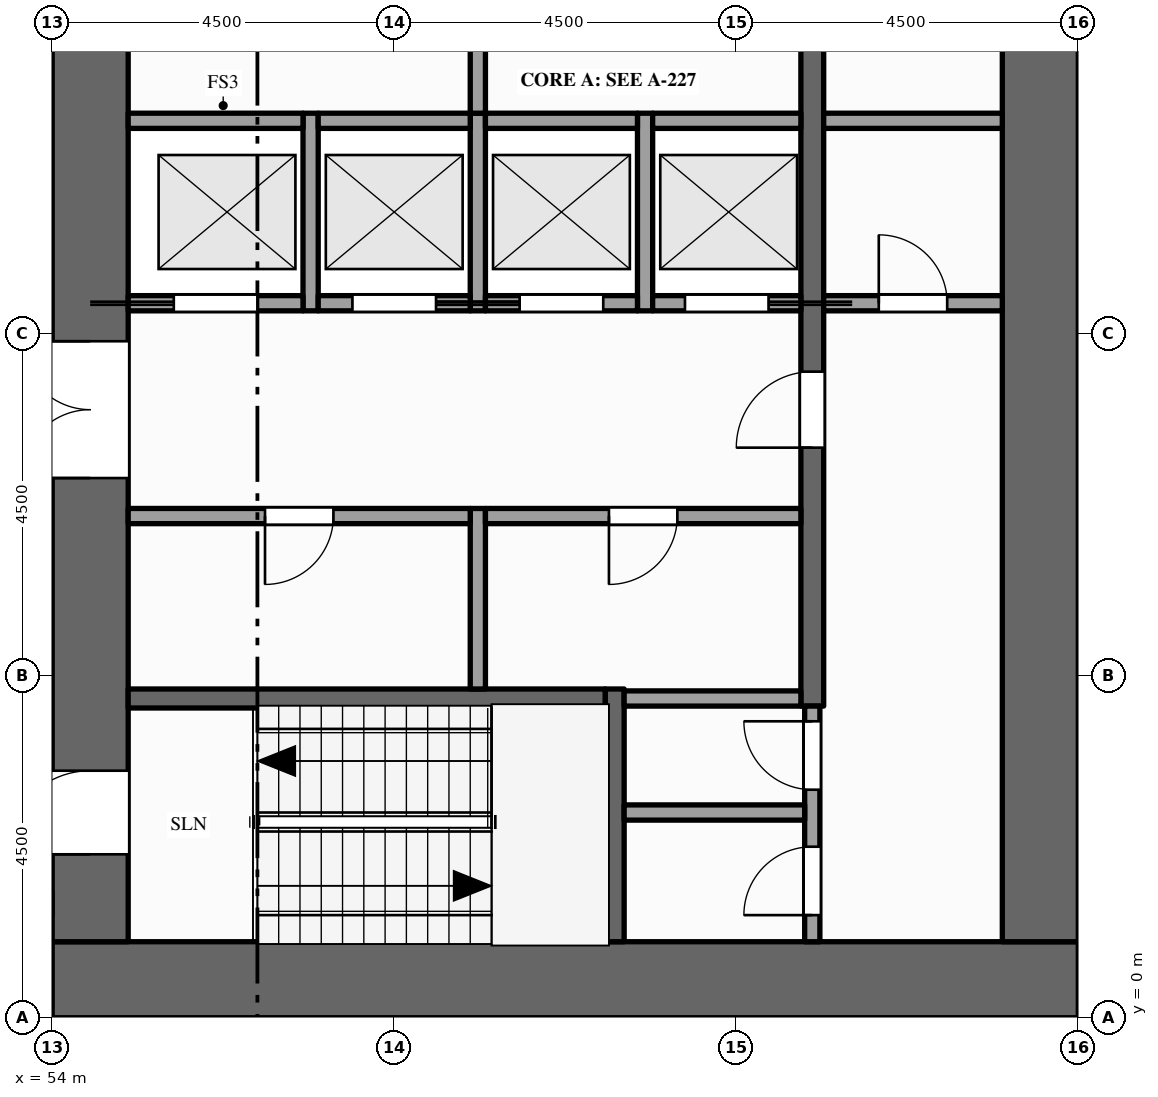
"""IFC4 building model, lengths in metres.
Left out: names, types, materials, properties, quantities, classifications, styles, units other than length and angle.
Written with IfcOpenShell. Run it as: python <this file> out.ifc"""

import sys

from ifc_helpers import new_model, si_unit, direction, frame, frame_2d, origin, place, context, subcontext, project, spatial, rectangle, extrude, element, fill, save


model = new_model("IFC4")
c1 = context("Model", 3, precision=1e-05, world=origin(), true_north=direction((0.0, 1.0)))
c2 = subcontext(c1, "Body", "Model", "MODEL_VIEW")
j1 = project(units=[si_unit("LENGTHUNIT", "METRE"), si_unit("PLANEANGLEUNIT", "RADIAN")], contexts=[c1])
p1 = place(None, origin())
s1 = spatial("IfcSite", under=j1, at=p1, CompositionType="ELEMENT")
p2 = place(p1, origin())
s2 = spatial("IfcBuilding", under=s1, at=p2, CompositionType="ELEMENT")
p3 = place(p2, frame((0.0, 0.0, 147.0)))
s3 = spatial("IfcBuildingStorey", under=s2, at=p3, CompositionType="ELEMENT", Elevation=147.0)
p4 = place(p3, frame((67.5, 0.5, -0.15), z_axis=(0.0, 0.0, 1.0), x_axis=(-1.0, 0.0, 0.0)))
e1 = element("IfcWall", 1, at=p4, inside=s3, PredefinedType="SHEAR", context=c2, shape_type="SweptSolid", body=[
    extrude(rectangle(XDim=13.5, YDim=1.0, at=frame_2d((6.75, 0.0))), origin(), (0.0, 0.0, 1.0), 4.0),
])
p5 = place(p3, frame((54.5, 1.0, -0.15), z_axis=(0.0, 0.0, 1.0), x_axis=(0.0, 1.0, 0.0)))
e2 = element("IfcWall", 2, at=p5, inside=s3, PredefinedType="SHEAR", context=c2, shape_type="SweptSolid", body=[
    extrude(rectangle(XDim=20.5, YDim=1.0, at=frame_2d((10.25, 0.0))), origin(), (0.0, 0.0, 1.0), 4.0),
])
p6 = place(p5, frame((6.1, 0.0, 0.15)))
e3 = element("IfcOpeningElement", 3, at=p6, cuts=e2, PredefinedType="OPENING", context=c2, shape_type="SweptSolid", body=[
    extrude(rectangle(XDim=1.8, YDim=2.1, at=frame_2d((0.9, 1.05))), frame((0.0, 0.51, 0.0), z_axis=(0.0, -1.0, 0.0), x_axis=(1.0, 0.0, 0.0)), (0.0, 0.0, 1.0), 1.02),
])
p7 = place(p5, frame((12.15, 0.0, 0.15)))
e4 = element("IfcOpeningElement", 4, at=p7, cuts=e2, PredefinedType="OPENING", context=c2, shape_type="SweptSolid", body=[
    extrude(rectangle(XDim=1.1, YDim=2.1, at=frame_2d((0.55, 1.05))), frame((0.0, 0.51, 0.0), z_axis=(0.0, -1.0, 0.0), x_axis=(1.0, 0.0, 0.0)), (0.0, 0.0, 1.0), 1.02),
])
p8 = place(p5, frame((1.15, 0.0, 0.15)))
e5 = element("IfcOpeningElement", 5, at=p8, cuts=e2, PredefinedType="OPENING", context=c2, shape_type="SweptSolid", body=[
    extrude(rectangle(XDim=1.1, YDim=2.1, at=frame_2d((0.55, 1.05))), frame((0.0, 0.51, 0.0), z_axis=(0.0, -1.0, 0.0), x_axis=(1.0, 0.0, 0.0)), (0.0, 0.0, 1.0), 1.02),
])
p9 = place(p5, frame((18.35, 0.0, 0.15)))
e6 = element("IfcOpeningElement", 6, at=p9, cuts=e2, PredefinedType="OPENING", context=c2, shape_type="SweptSolid", body=[
    extrude(rectangle(XDim=1.1, YDim=2.1, at=frame_2d((0.55, 1.05))), frame((0.0, 0.51, 0.0), z_axis=(0.0, -1.0, 0.0), x_axis=(1.0, 0.0, 0.0)), (0.0, 0.0, 1.0), 1.02),
])
p10 = place(p3, frame((67.0, 1.0, -0.15), z_axis=(0.0, 0.0, 1.0), x_axis=(0.0, 1.0, 0.0)))
e7 = element("IfcWall", 7, at=p10, inside=s3, PredefinedType="SHEAR", context=c2, shape_type="SweptSolid", body=[
    extrude(rectangle(XDim=20.5, YDim=1.0, at=frame_2d((10.25, 0.0))), origin(), (0.0, 0.0, 1.0), 4.0),
])
p11 = place(p3, frame((57.4, 9.3, 0.0), z_axis=(0.0, 0.0, 1.0), x_axis=(0.0, 1.0, 0.0)))
e8 = element("IfcWall", 8, at=p11, inside=s3, PredefinedType="SOLIDWALL", context=c2, shape_type="SweptSolid", body=[
    extrude(rectangle(XDim=2.6, YDim=0.2, at=frame_2d((1.3, 0.0))), origin(), (0.0, 0.0, 1.0), 3.85),
])
p12 = place(p3, frame((59.6, 4.325, 0.0), z_axis=(0.0, 0.0, 1.0), x_axis=(0.0, 1.0, 0.0)))
e9 = element("IfcWall", 9, at=p12, inside=s3, PredefinedType="PARTITIONING", context=c2, shape_type="SweptSolid", body=[
    extrude(rectangle(XDim=2.375, YDim=0.2, at=frame_2d((1.188, 0.0))), origin(), (0.0, 0.0, 1.0), 3.85),
])
p13 = place(p3, frame((59.6, 9.3, 0.0), z_axis=(0.0, 0.0, 1.0), x_axis=(0.0, 1.0, 0.0)))
e10 = element("IfcWall", 10, at=p13, inside=s3, PredefinedType="SOLIDWALL", context=c2, shape_type="SweptSolid", body=[
    extrude(rectangle(XDim=2.6, YDim=0.2, at=frame_2d((1.3, 0.0))), origin(), (0.0, 0.0, 1.0), 3.85),
])
p14 = place(p3, frame((59.6, 11.9, 0.0), z_axis=(0.0, 0.0, 1.0), x_axis=(0.0, 1.0, 0.0)))
e11 = element("IfcWall", 11, at=p14, inside=s3, PredefinedType="PARTITIONING", context=c2, shape_type="SweptSolid", body=[
    extrude(rectangle(XDim=3.6, YDim=0.2, at=frame_2d((1.8, 0.0))), origin(), (0.0, 0.0, 1.0), 3.85),
])
p15 = place(p14, frame((1.3, 0.0, 0.0)))
e12 = element("IfcOpeningElement", 12, at=p15, cuts=e11, PredefinedType="OPENING", context=c2, shape_type="SweptSolid", body=[
    extrude(rectangle(XDim=1.0, YDim=2.1, at=frame_2d((0.5, 1.05))), frame((0.0, 0.11, 0.0), z_axis=(0.0, -1.0, 0.0), x_axis=(1.0, 0.0, 0.0)), (0.0, 0.0, 1.0), 0.22),
])
p16 = place(p3, frame((61.4, 1.0, 0.0), z_axis=(0.0, 0.0, 1.0), x_axis=(0.0, 1.0, 0.0)))
e13 = element("IfcWall", 13, at=p16, inside=s3, PredefinedType="SHEAR", context=c2, shape_type="SweptSolid", body=[
    extrude(rectangle(XDim=3.325, YDim=0.25, at=frame_2d((1.663, 0.0))), origin(), (0.0, 0.0, 1.0), 3.85),
])
p17 = place(p3, frame((61.8, 9.3, 0.0), z_axis=(0.0, 0.0, 1.0), x_axis=(0.0, 1.0, 0.0)))
e14 = element("IfcWall", 14, at=p17, inside=s3, PredefinedType="SOLIDWALL", context=c2, shape_type="SweptSolid", body=[
    extrude(rectangle(XDim=2.6, YDim=0.2, at=frame_2d((1.3, 0.0))), origin(), (0.0, 0.0, 1.0), 3.85),
])
p18 = place(p3, frame((64.0, 1.0, 0.0), z_axis=(0.0, 0.0, 1.0), x_axis=(0.0, 1.0, 0.0)))
e15 = element("IfcWall", 15, at=p18, inside=s3, PredefinedType="PARTITIONING", context=c2, shape_type="SweptSolid", body=[
    extrude(rectangle(XDim=3.1, YDim=0.2, at=frame_2d((1.55, 0.0))), origin(), (0.0, 0.0, 1.0), 3.85),
])
p19 = place(p18, frame((0.35, 0.0, 0.0)))
e16 = element("IfcOpeningElement", 16, at=p19, cuts=e15, PredefinedType="OPENING", context=c2, shape_type="SweptSolid", body=[
    extrude(rectangle(XDim=0.9, YDim=2.1, at=frame_2d((0.45, 1.05))), frame((0.0, 0.11, 0.0), z_axis=(0.0, -1.0, 0.0), x_axis=(1.0, 0.0, 0.0)), (0.0, 0.0, 1.0), 0.22),
])
p20 = place(p18, frame((2.0, 0.0, 0.0)))
e17 = element("IfcOpeningElement", 17, at=p20, cuts=e15, PredefinedType="OPENING", context=c2, shape_type="SweptSolid", body=[
    extrude(rectangle(XDim=0.9, YDim=2.1, at=frame_2d((0.45, 1.05))), frame((0.0, 0.11, 0.0), z_axis=(0.0, -1.0, 0.0), x_axis=(1.0, 0.0, 0.0)), (0.0, 0.0, 1.0), 0.22),
])
p21 = place(p3, frame((64.0, 4.1, 0.0), z_axis=(0.0, 0.0, 1.0), x_axis=(0.0, 1.0, 0.0)))
e18 = element("IfcWall", 18, at=p21, inside=s3, PredefinedType="SHEAR", context=c2, shape_type="SweptSolid", body=[
    extrude(rectangle(XDim=14.5, YDim=0.3, at=frame_2d((7.25, 0.0))), origin(), (0.0, 0.0, 1.0), 3.85),
])
p22 = place(p21, frame((3.4, 0.0, 0.0)))
e19 = element("IfcOpeningElement", 19, at=p22, cuts=e18, PredefinedType="OPENING", context=c2, shape_type="SweptSolid", body=[
    extrude(rectangle(XDim=1.0, YDim=2.1, at=frame_2d((0.5, 1.05))), frame((0.0, 0.16, 0.0), z_axis=(0.0, -1.0, 0.0), x_axis=(1.0, 0.0, 0.0)), (0.0, 0.0, 1.0), 0.32),
])
p23 = place(p21, frame((9.1, 0.0, 0.0)))
e20 = element("IfcOpeningElement", 20, at=p23, cuts=e18, PredefinedType="OPENING", context=c2, shape_type="SweptSolid", body=[
    extrude(rectangle(XDim=1.0, YDim=2.1, at=frame_2d((0.5, 1.05))), frame((0.0, 0.16, 0.0), z_axis=(0.0, -1.0, 0.0), x_axis=(1.0, 0.0, 0.0)), (0.0, 0.0, 1.0), 0.32),
])
p24 = place(p3, frame((61.525, 2.7, 0.0), z_axis=(0.0, 0.0, 1.0), x_axis=(1.0, 0.0, 0.0)))
e21 = element("IfcWall", 21, at=p24, inside=s3, PredefinedType="PARTITIONING", context=c2, shape_type="SweptSolid", body=[
    extrude(rectangle(XDim=2.375, YDim=0.2, at=frame_2d((1.188, 0.0))), origin(), (0.0, 0.0, 1.0), 3.85),
])
p25 = place(p3, frame((55.0, 4.2, 0.0), z_axis=(0.0, 0.0, 1.0), x_axis=(1.0, 0.0, 0.0)))
e22 = element("IfcWall", 22, at=p25, inside=s3, PredefinedType="SHEAR", context=c2, shape_type="SweptSolid", body=[
    extrude(rectangle(XDim=6.275, YDim=0.25, at=frame_2d((3.137, 0.0))), origin(), (0.0, 0.0, 1.0), 3.85),
])
p26 = place(p3, frame((61.525, 4.2, 0.0), z_axis=(0.0, 0.0, 1.0), x_axis=(1.0, 0.0, 0.0)))
e23 = element("IfcWall", 23, at=p26, inside=s3, PredefinedType="PARTITIONING", context=c2, shape_type="SweptSolid", body=[
    extrude(rectangle(XDim=2.325, YDim=0.2, at=frame_2d((1.163, 0.0))), origin(), (0.0, 0.0, 1.0), 3.85),
])
p27 = place(p3, frame((55.0, 6.6, 0.0), z_axis=(0.0, 0.0, 1.0), x_axis=(1.0, 0.0, 0.0)))
e24 = element("IfcWall", 24, at=p27, inside=s3, PredefinedType="PARTITIONING", context=c2, shape_type="SweptSolid", body=[
    extrude(rectangle(XDim=4.5, YDim=0.2, at=frame_2d((2.25, 0.0))), origin(), (0.0, 0.0, 1.0), 3.85),
])
p28 = place(p27, frame((1.8, 0.0, 0.0)))
e25 = element("IfcOpeningElement", 25, at=p28, cuts=e24, PredefinedType="OPENING", context=c2, shape_type="SweptSolid", body=[
    extrude(rectangle(XDim=0.9, YDim=2.1, at=frame_2d((0.45, 1.05))), frame((0.0, 0.11, 0.0), z_axis=(0.0, -1.0, 0.0), x_axis=(1.0, 0.0, 0.0)), (0.0, 0.0, 1.0), 0.22),
])
p29 = place(p3, frame((59.7, 6.6, 0.0), z_axis=(0.0, 0.0, 1.0), x_axis=(1.0, 0.0, 0.0)))
e26 = element("IfcWall", 26, at=p29, inside=s3, PredefinedType="PARTITIONING", context=c2, shape_type="SweptSolid", body=[
    extrude(rectangle(XDim=4.15, YDim=0.2, at=frame_2d((2.075, 0.0))), origin(), (0.0, 0.0, 1.0), 3.85),
])
p30 = place(p29, frame((1.625, 0.0, 0.0)))
e27 = element("IfcOpeningElement", 27, at=p30, cuts=e26, PredefinedType="OPENING", context=c2, shape_type="SweptSolid", body=[
    extrude(rectangle(XDim=0.9, YDim=2.1, at=frame_2d((0.45, 1.05))), frame((0.0, 0.11, 0.0), z_axis=(0.0, -1.0, 0.0), x_axis=(1.0, 0.0, 0.0)), (0.0, 0.0, 1.0), 0.22),
])
p31 = place(p3, frame((55.0, 9.4, 0.0), z_axis=(0.0, 0.0, 1.0), x_axis=(1.0, 0.0, 0.0)))
e28 = element("IfcWall", 28, at=p31, inside=s3, PredefinedType="SOLIDWALL", context=c2, shape_type="SweptSolid", body=[
    extrude(rectangle(XDim=2.3, YDim=0.2, at=frame_2d((1.15, 0.0))), origin(), (0.0, 0.0, 1.0), 3.85),
])
p32 = place(p31, frame((0.6, 0.0, 0.012)))
e29 = element("IfcOpeningElement", 29, at=p32, cuts=e28, PredefinedType="OPENING", context=c2, shape_type="SweptSolid", body=[
    extrude(rectangle(XDim=1.1, YDim=2.1, at=frame_2d((0.55, 1.05))), frame((0.0, 0.11, 0.0), z_axis=(0.0, -1.0, 0.0), x_axis=(1.0, 0.0, 0.0)), (0.0, 0.0, 1.0), 0.22),
])
p33 = place(p3, frame((57.5, 9.4, 0.0), z_axis=(0.0, 0.0, 1.0), x_axis=(1.0, 0.0, 0.0)))
e30 = element("IfcWall", 30, at=p33, inside=s3, PredefinedType="SOLIDWALL", context=c2, shape_type="SweptSolid", body=[
    extrude(rectangle(XDim=2.0, YDim=0.2, at=frame_2d((1.0, 0.0))), origin(), (0.0, 0.0, 1.0), 3.85),
])
p34 = place(p33, frame((0.45, 0.0, 0.012)))
e31 = element("IfcOpeningElement", 31, at=p34, cuts=e30, PredefinedType="OPENING", context=c2, shape_type="SweptSolid", body=[
    extrude(rectangle(XDim=1.1, YDim=2.1, at=frame_2d((0.55, 1.05))), frame((0.0, 0.11, 0.0), z_axis=(0.0, -1.0, 0.0), x_axis=(1.0, 0.0, 0.0)), (0.0, 0.0, 1.0), 0.22),
])
p35 = place(p3, frame((59.7, 9.4, 0.0), z_axis=(0.0, 0.0, 1.0), x_axis=(1.0, 0.0, 0.0)))
e32 = element("IfcWall", 32, at=p35, inside=s3, PredefinedType="SOLIDWALL", context=c2, shape_type="SweptSolid", body=[
    extrude(rectangle(XDim=2.0, YDim=0.2, at=frame_2d((1.0, 0.0))), origin(), (0.0, 0.0, 1.0), 3.85),
])
p36 = place(p35, frame((0.45, 0.0, 0.012)))
e33 = element("IfcOpeningElement", 33, at=p36, cuts=e32, PredefinedType="OPENING", context=c2, shape_type="SweptSolid", body=[
    extrude(rectangle(XDim=1.1, YDim=2.1, at=frame_2d((0.55, 1.05))), frame((0.0, 0.11, 0.0), z_axis=(0.0, -1.0, 0.0), x_axis=(1.0, 0.0, 0.0)), (0.0, 0.0, 1.0), 0.22),
])
p37 = place(p3, frame((61.9, 9.4, 0.0), z_axis=(0.0, 0.0, 1.0), x_axis=(1.0, 0.0, 0.0)))
e34 = element("IfcWall", 34, at=p37, inside=s3, PredefinedType="SOLIDWALL", context=c2, shape_type="SweptSolid", body=[
    extrude(rectangle(XDim=1.95, YDim=0.2, at=frame_2d((0.975, 0.0))), origin(), (0.0, 0.0, 1.0), 3.85),
])
p38 = place(p37, frame((0.425, 0.0, 0.012)))
e35 = element("IfcOpeningElement", 35, at=p38, cuts=e34, PredefinedType="OPENING", context=c2, shape_type="SweptSolid", body=[
    extrude(rectangle(XDim=1.1, YDim=2.1, at=frame_2d((0.55, 1.05))), frame((0.0, 0.11, 0.0), z_axis=(0.0, -1.0, 0.0), x_axis=(1.0, 0.0, 0.0)), (0.0, 0.0, 1.0), 0.22),
])
p39 = place(p3, frame((64.15, 9.4, 0.0), z_axis=(0.0, 0.0, 1.0), x_axis=(1.0, 0.0, 0.0)))
e36 = element("IfcWall", 36, at=p39, inside=s3, PredefinedType="PARTITIONING", context=c2, shape_type="SweptSolid", body=[
    extrude(rectangle(XDim=2.35, YDim=0.2, at=frame_2d((1.175, 0.0))), origin(), (0.0, 0.0, 1.0), 3.85),
])
p40 = place(p39, frame((0.725, 0.0, 0.0)))
e37 = element("IfcOpeningElement", 37, at=p40, cuts=e36, PredefinedType="OPENING", context=c2, shape_type="SweptSolid", body=[
    extrude(rectangle(XDim=0.9, YDim=2.1, at=frame_2d((0.45, 1.05))), frame((0.0, 0.11, 0.0), z_axis=(0.0, -1.0, 0.0), x_axis=(1.0, 0.0, 0.0)), (0.0, 0.0, 1.0), 0.22),
])
p41 = place(p3, frame((55.0, 11.8, 0.0), z_axis=(0.0, 0.0, 1.0), x_axis=(1.0, 0.0, 0.0)))
e38 = element("IfcWall", 38, at=p41, inside=s3, PredefinedType="SOLIDWALL", context=c2, shape_type="SweptSolid", body=[
    extrude(rectangle(XDim=2.3, YDim=0.2, at=frame_2d((1.15, 0.0))), origin(), (0.0, 0.0, 1.0), 3.85),
])
for number, where, z_axis, x_axis in (
    (39, (57.5, 11.8, 0.0), (0.0, 0.0, 1.0), (1.0, 0.0, 0.0)),
    (40, (59.7, 11.8, 0.0), (0.0, 0.0, 1.0), (1.0, 0.0, 0.0)),
):
    element("IfcWall", number, at=place(p3, frame(where, z_axis=z_axis, x_axis=x_axis)), inside=s3, PredefinedType="SOLIDWALL", context=c2, shape_type="SweptSolid", body=[
        extrude(rectangle(XDim=2.0, YDim=0.2, at=frame_2d((1.0, 0.0))), origin(), (0.0, 0.0, 1.0), 3.85),
    ])
p42 = place(p3, frame((61.9, 11.8, 0.0), z_axis=(0.0, 0.0, 1.0), x_axis=(1.0, 0.0, 0.0)))
e41 = element("IfcWall", 41, at=p42, inside=s3, PredefinedType="SOLIDWALL", context=c2, shape_type="SweptSolid", body=[
    extrude(rectangle(XDim=1.95, YDim=0.2, at=frame_2d((0.975, 0.0))), origin(), (0.0, 0.0, 1.0), 3.85),
])
p43 = place(p3, frame((64.15, 11.8, 0.0), z_axis=(0.0, 0.0, 1.0), x_axis=(1.0, 0.0, 0.0)))
e42 = element("IfcWall", 42, at=p43, inside=s3, PredefinedType="PARTITIONING", context=c2, shape_type="SweptSolid", body=[
    extrude(rectangle(XDim=2.35, YDim=0.2, at=frame_2d((1.175, 0.0))), origin(), (0.0, 0.0, 1.0), 3.85),
])
p44 = place(p32, origin())
e43 = element("IfcDoor", 43, at=p44, inside=s3, OperationType="SLIDING_TO_LEFT", PredefinedType="DOOR", context=c2, shape_type="SweptSolid", body=[
    extrude(rectangle(XDim=1.1, YDim=2.1, at=frame_2d((0.55, 1.05))), frame((0.0, 0.025, 0.0), z_axis=(0.0, -1.0, 0.0), x_axis=(1.0, 0.0, 0.0)), (0.0, 0.0, 1.0), 0.05),
])
fill(e29, e43)
p45 = place(p34, origin())
e44 = element("IfcDoor", 44, at=p45, inside=s3, OperationType="SLIDING_TO_RIGHT", PredefinedType="DOOR", context=c2, shape_type="SweptSolid", body=[
    extrude(rectangle(XDim=1.1, YDim=2.1, at=frame_2d((0.55, 1.05))), frame((0.0, 0.025, 0.0), z_axis=(0.0, -1.0, 0.0), x_axis=(1.0, 0.0, 0.0)), (0.0, 0.0, 1.0), 0.05),
])
fill(e31, e44)
p46 = place(p36, origin())
e45 = element("IfcDoor", 45, at=p46, inside=s3, OperationType="SLIDING_TO_LEFT", PredefinedType="DOOR", context=c2, shape_type="SweptSolid", body=[
    extrude(rectangle(XDim=1.1, YDim=2.1, at=frame_2d((0.55, 1.05))), frame((0.0, 0.025, 0.0), z_axis=(0.0, -1.0, 0.0), x_axis=(1.0, 0.0, 0.0)), (0.0, 0.0, 1.0), 0.05),
])
fill(e33, e45)
p47 = place(p38, origin())
e46 = element("IfcDoor", 46, at=p47, inside=s3, OperationType="SLIDING_TO_RIGHT", PredefinedType="DOOR", context=c2, shape_type="SweptSolid", body=[
    extrude(rectangle(XDim=1.1, YDim=2.1, at=frame_2d((0.55, 1.05))), frame((0.0, 0.025, 0.0), z_axis=(0.0, -1.0, 0.0), x_axis=(1.0, 0.0, 0.0)), (0.0, 0.0, 1.0), 0.05),
])
fill(e35, e46)
p48 = place(p6, origin())
e47 = element("IfcDoor", 47, at=p48, inside=s3, OperationType="DOUBLE_DOOR_SINGLE_SWING", PredefinedType="DOOR", context=c2, shape_type="SweptSolid", body=[
    extrude(rectangle(XDim=1.8, YDim=2.1, at=frame_2d((0.9, 1.05))), frame((0.0, 0.025, 0.0), z_axis=(0.0, -1.0, 0.0), x_axis=(1.0, 0.0, 0.0)), (0.0, 0.0, 1.0), 0.05),
])
fill(e3, e47)
p49 = place(p22, origin())
e48 = element("IfcDoor", 48, at=p49, inside=s3, OperationType="SINGLE_SWING_LEFT", PredefinedType="DOOR", context=c2, shape_type="SweptSolid", body=[
    extrude(rectangle(XDim=1.0, YDim=2.1, at=frame_2d((0.5, 1.05))), frame((0.0, 0.025, 0.0), z_axis=(0.0, -1.0, 0.0), x_axis=(1.0, 0.0, 0.0)), (0.0, 0.0, 1.0), 0.05),
])
fill(e19, e48)
p50 = place(p40, origin())
e49 = element("IfcDoor", 49, at=p50, inside=s3, OperationType="SINGLE_SWING_LEFT", PredefinedType="DOOR", context=c2, shape_type="SweptSolid", body=[
    extrude(rectangle(XDim=0.9, YDim=2.1, at=frame_2d((0.45, 1.05))), frame((0.0, 0.025, 0.0), z_axis=(0.0, -1.0, 0.0), x_axis=(1.0, 0.0, 0.0)), (0.0, 0.0, 1.0), 0.05),
])
fill(e37, e49)
p51 = place(p8, origin())
e50 = element("IfcDoor", 50, at=p51, inside=s3, OperationType="SINGLE_SWING_LEFT", PredefinedType="DOOR", context=c2, shape_type="SweptSolid", body=[
    extrude(rectangle(XDim=1.1, YDim=2.1, at=frame_2d((0.55, 1.05))), frame((0.0, 0.025, 0.0), z_axis=(0.0, -1.0, 0.0), x_axis=(1.0, 0.0, 0.0)), (0.0, 0.0, 1.0), 0.05),
])
fill(e5, e50)
p52 = place(p19, origin())
e51 = element("IfcDoor", 51, at=p52, inside=s3, OperationType="SINGLE_SWING_LEFT", PredefinedType="DOOR", context=c2, shape_type="SweptSolid", body=[
    extrude(rectangle(XDim=0.9, YDim=2.1, at=frame_2d((0.45, 1.05))), frame((0.0, 0.025, 0.0), z_axis=(0.0, -1.0, 0.0), x_axis=(1.0, 0.0, 0.0)), (0.0, 0.0, 1.0), 0.05),
])
fill(e16, e51)
p53 = place(p20, origin())
e52 = element("IfcDoor", 52, at=p53, inside=s3, OperationType="SINGLE_SWING_RIGHT", PredefinedType="DOOR", context=c2, shape_type="SweptSolid", body=[
    extrude(rectangle(XDim=0.9, YDim=2.1, at=frame_2d((0.45, 1.05))), frame((0.0, 0.025, 0.0), z_axis=(0.0, -1.0, 0.0), x_axis=(1.0, 0.0, 0.0)), (0.0, 0.0, 1.0), 0.05),
])
fill(e17, e52)
p54 = place(p28, origin())
e53 = element("IfcDoor", 53, at=p54, inside=s3, OperationType="SINGLE_SWING_LEFT", PredefinedType="DOOR", context=c2, shape_type="SweptSolid", body=[
    extrude(rectangle(XDim=0.9, YDim=2.1, at=frame_2d((0.45, 1.05))), frame((0.0, 0.025, 0.0), z_axis=(0.0, -1.0, 0.0), x_axis=(1.0, 0.0, 0.0)), (0.0, 0.0, 1.0), 0.05),
])
fill(e25, e53)
p55 = place(p30, origin())
e54 = element("IfcDoor", 54, at=p55, inside=s3, OperationType="SINGLE_SWING_LEFT", PredefinedType="DOOR", context=c2, shape_type="SweptSolid", body=[
    extrude(rectangle(XDim=0.9, YDim=2.1, at=frame_2d((0.45, 1.05))), frame((0.0, 0.025, 0.0), z_axis=(0.0, -1.0, 0.0), x_axis=(1.0, 0.0, 0.0)), (0.0, 0.0, 1.0), 0.05),
])
fill(e27, e54)
save(model, sys.argv[1])
